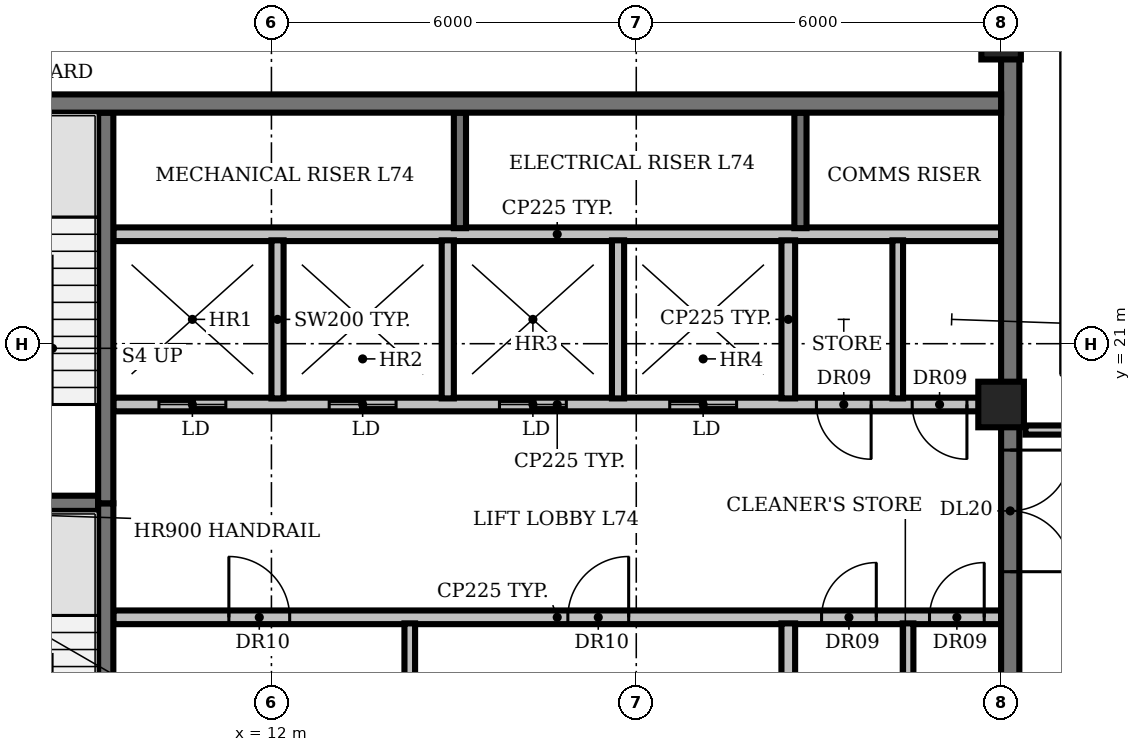
"""IFC4 building model, lengths in metres.
Left out: names, types, materials, properties, quantities, classifications, styles, units other than length and angle.
Written with IfcOpenShell. Run it as: python <this file> out.ifc"""

import sys

from ifc_helpers import new_model, si_unit, direction, frame, frame_2d, origin, origin_2d, place, context, subcontext, project, spatial, rectangle, circle, extrude, element, fill, save


model = new_model("IFC4")
c1 = context("Model", 3, precision=1e-05, world=origin(), true_north=direction((0.0, 1.0)))
c2 = subcontext(c1, "Body", "Model", "MODEL_VIEW")
j1 = project(units=[si_unit("LENGTHUNIT", "METRE"), si_unit("PLANEANGLEUNIT", "RADIAN")], contexts=[c1])
p1 = place(None, origin())
s1 = spatial("IfcSite", under=j1, at=p1, CompositionType="ELEMENT")
p2 = place(p1, origin())
s2 = spatial("IfcBuilding", under=s1, at=p2, CompositionType="ELEMENT")
p3 = place(p2, frame((0.0, 0.0, 331.4)))
s3 = spatial("IfcBuildingStorey", under=s2, at=p3, CompositionType="ELEMENT", Elevation=331.4)
p4 = place(p3, frame((24.0, 20.0, 0.0), z_axis=(0.0, 0.0, 1.0), x_axis=(1.0, 0.0, 0.0)))
e1 = element("IfcColumn", 1, at=p4, inside=s3, PredefinedType="COLUMN", context=c2, shape_type="SweptSolid", body=[
    extrude(circle(Radius=0.375, at=origin_2d()), origin(), (0.0, 0.0, 1.0), 3.9),
])
p5 = place(p3, frame((24.0, 26.0, 0.0), z_axis=(0.0, 0.0, 1.0), x_axis=(1.0, 0.0, 0.0)))
e2 = element("IfcColumn", 2, at=p5, inside=s3, PredefinedType="COLUMN", context=c2, shape_type="SweptSolid", body=[
    extrude(rectangle(XDim=0.65, YDim=0.65, at=origin_2d()), origin(), (0.0, 0.0, 1.0), 3.9),
])
p6 = place(p3, frame((9.4, 16.5, 0.0), z_axis=(0.0, 0.0, 1.0), x_axis=(1.0, 0.0, 0.0)))
e3 = element("IfcWall", 3, at=p6, inside=s3, PredefinedType="PARTITIONING", context=c2, shape_type="SweptSolid", body=[
    extrude(rectangle(XDim=14.6, YDim=0.225, at=frame_2d((7.3, 0.0))), origin(), (0.0, 0.0, 1.0), 3.9),
])
p7 = place(p6, frame((1.9, 0.0, 0.0)))
e4 = element("IfcOpeningElement", 4, at=p7, cuts=e3, PredefinedType="OPENING", context=c2, shape_type="SweptSolid", body=[
    extrude(rectangle(XDim=1.0, YDim=2.1, at=frame_2d((0.5, 1.05))), frame((0.0, 0.123, 0.0), z_axis=(0.0, -1.0, 0.0), x_axis=(1.0, 0.0, 0.0)), (0.0, 0.0, 1.0), 0.245),
])
p8 = place(p6, frame((7.475, 0.0, 0.0)))
e5 = element("IfcOpeningElement", 5, at=p8, cuts=e3, PredefinedType="OPENING", context=c2, shape_type="SweptSolid", body=[
    extrude(rectangle(XDim=1.0, YDim=2.1, at=frame_2d((0.5, 1.05))), frame((0.0, 0.123, 0.0), z_axis=(0.0, -1.0, 0.0), x_axis=(1.0, 0.0, 0.0)), (0.0, 0.0, 1.0), 0.245),
])
p9 = place(p6, frame((11.647, 0.0, 0.0)))
e6 = element("IfcOpeningElement", 6, at=p9, cuts=e3, PredefinedType="OPENING", context=c2, shape_type="SweptSolid", body=[
    extrude(rectangle(XDim=0.9, YDim=2.1, at=frame_2d((0.45, 1.05))), frame((0.0, 0.123, 0.0), z_axis=(0.0, -1.0, 0.0), x_axis=(1.0, 0.0, 0.0)), (0.0, 0.0, 1.0), 0.245),
])
p10 = place(p6, frame((13.423, 0.0, 0.0)))
e7 = element("IfcOpeningElement", 7, at=p10, cuts=e3, PredefinedType="OPENING", context=c2, shape_type="SweptSolid", body=[
    extrude(rectangle(XDim=0.9, YDim=2.1, at=frame_2d((0.45, 1.05))), frame((0.0, 0.123, 0.0), z_axis=(0.0, -1.0, 0.0), x_axis=(1.0, 0.0, 0.0)), (0.0, 0.0, 1.0), 0.245),
])
p11 = place(p3, frame((6.0, 18.375, 0.0), z_axis=(0.0, 0.0, 1.0), x_axis=(1.0, 0.0, 0.0)))
e8 = element("IfcWall", 8, at=p11, inside=s3, PredefinedType="SHEAR", context=c2, shape_type="SweptSolid", body=[
    extrude(rectangle(XDim=3.15, YDim=0.25, at=frame_2d((1.575, 0.0))), origin(), (0.0, 0.0, 1.0), 3.9),
])
p12 = place(p3, frame((24.0, 20.0, 0.0), z_axis=(0.0, 0.0, 1.0), x_axis=(-1.0, 0.0, 0.0)))
e9 = element("IfcWall", 9, at=p12, inside=s3, PredefinedType="PARTITIONING", context=c2, shape_type="SweptSolid", body=[
    extrude(rectangle(XDim=14.6, YDim=0.225, at=frame_2d((7.3, 0.0))), origin(), (0.0, 0.0, 1.0), 3.9),
])
p13 = place(p12, frame((12.75, 0.0, 0.0)))
e10 = element("IfcOpeningElement", 10, at=p13, cuts=e9, PredefinedType="OPENING", context=c2, shape_type="SweptSolid", body=[
    extrude(rectangle(XDim=1.1, YDim=2.1, at=frame_2d((0.55, 1.05))), frame((0.0, 0.123, 0.0), z_axis=(0.0, -1.0, 0.0), x_axis=(1.0, 0.0, 0.0)), (0.0, 0.0, 1.0), 0.245),
])
p14 = place(p12, frame((9.95, 0.0, 0.0)))
e11 = element("IfcOpeningElement", 11, at=p14, cuts=e9, PredefinedType="OPENING", context=c2, shape_type="SweptSolid", body=[
    extrude(rectangle(XDim=1.1, YDim=2.1, at=frame_2d((0.55, 1.05))), frame((0.0, 0.123, 0.0), z_axis=(0.0, -1.0, 0.0), x_axis=(1.0, 0.0, 0.0)), (0.0, 0.0, 1.0), 0.245),
])
p15 = place(p12, frame((7.15, 0.0, 0.0)))
e12 = element("IfcOpeningElement", 12, at=p15, cuts=e9, PredefinedType="OPENING", context=c2, shape_type="SweptSolid", body=[
    extrude(rectangle(XDim=1.1, YDim=2.1, at=frame_2d((0.55, 1.05))), frame((0.0, 0.123, 0.0), z_axis=(0.0, -1.0, 0.0), x_axis=(1.0, 0.0, 0.0)), (0.0, 0.0, 1.0), 0.245),
])
p16 = place(p12, frame((4.35, 0.0, 0.0)))
e13 = element("IfcOpeningElement", 13, at=p16, cuts=e9, PredefinedType="OPENING", context=c2, shape_type="SweptSolid", body=[
    extrude(rectangle(XDim=1.1, YDim=2.1, at=frame_2d((0.55, 1.05))), frame((0.0, 0.123, 0.0), z_axis=(0.0, -1.0, 0.0), x_axis=(1.0, 0.0, 0.0)), (0.0, 0.0, 1.0), 0.245),
])
p17 = place(p12, frame((2.137, 0.0, 0.0)))
e14 = element("IfcOpeningElement", 14, at=p17, cuts=e9, PredefinedType="OPENING", context=c2, shape_type="SweptSolid", body=[
    extrude(rectangle(XDim=0.9, YDim=2.1, at=frame_2d((0.45, 1.05))), frame((0.0, 0.123, 0.0), z_axis=(0.0, -1.0, 0.0), x_axis=(1.0, 0.0, 0.0)), (0.0, 0.0, 1.0), 0.245),
])
p18 = place(p12, frame((0.562, 0.0, 0.0)))
e15 = element("IfcOpeningElement", 15, at=p18, cuts=e9, PredefinedType="OPENING", context=c2, shape_type="SweptSolid", body=[
    extrude(rectangle(XDim=0.9, YDim=2.1, at=frame_2d((0.45, 1.05))), frame((0.0, 0.123, 0.0), z_axis=(0.0, -1.0, 0.0), x_axis=(1.0, 0.0, 0.0)), (0.0, 0.0, 1.0), 0.245),
])
p19 = place(p3, frame((9.4, 22.8, 0.0), z_axis=(0.0, 0.0, 1.0), x_axis=(1.0, 0.0, 0.0)))
e16 = element("IfcWall", 16, at=p19, inside=s3, PredefinedType="PARTITIONING", context=c2, shape_type="SweptSolid", body=[
    extrude(rectangle(XDim=14.6, YDim=0.225, at=frame_2d((7.3, 0.0))), origin(), (0.0, 0.0, 1.0), 3.9),
])
p20 = place(p3, frame((9.275, 18.375, 0.0), z_axis=(0.0, 0.0, 1.0), x_axis=(0.0, -1.0, 0.0)))
e17 = element("IfcWall", 17, at=p20, inside=s3, PredefinedType="SHEAR", context=c2, shape_type="SweptSolid", body=[
    extrude(rectangle(XDim=6.55, YDim=0.25, at=frame_2d((3.275, 0.0))), origin(), (0.0, 0.0, 1.0), 3.9),
])
p21 = place(p20, frame((5.075, 0.0, 0.0)))
e18 = element("IfcOpeningElement", 18, at=p21, cuts=e17, PredefinedType="OPENING", context=c2, shape_type="SweptSolid", body=[
    extrude(rectangle(XDim=1.0, YDim=2.1, at=frame_2d((0.5, 1.05))), frame((0.0, 0.135, 0.0), z_axis=(0.0, -1.0, 0.0), x_axis=(1.0, 0.0, 0.0)), (0.0, 0.0, 1.0), 0.27),
])
p22 = place(p3, frame((9.275, 18.375, 0.0), z_axis=(0.0, 0.0, 1.0), x_axis=(0.0, 1.0, 0.0)))
e19 = element("IfcWall", 19, at=p22, inside=s3, PredefinedType="SHEAR", context=c2, shape_type="SweptSolid", body=[
    extrude(rectangle(XDim=6.425, YDim=0.25, at=frame_2d((3.212, 0.0))), origin(), (0.0, 0.0, 1.0), 3.9),
])
p23 = place(p3, frame((12.1, 20.1, 0.0), z_axis=(0.0, 0.0, 1.0), x_axis=(0.0, 1.0, 0.0)))
e20 = element("IfcWall", 20, at=p23, inside=s3, PredefinedType="SOLIDWALL", context=c2, shape_type="SweptSolid", body=[
    extrude(rectangle(XDim=2.6, YDim=0.2, at=frame_2d((1.3, 0.0))), origin(), (0.0, 0.0, 1.0), 3.9),
])
p24 = place(p3, frame((14.275, 13.8, 0.0), z_axis=(0.0, 0.0, 1.0), x_axis=(0.0, 1.0, 0.0)))
e21 = element("IfcWall", 21, at=p24, inside=s3, PredefinedType="PARTITIONING", context=c2, shape_type="SweptSolid", body=[
    extrude(rectangle(XDim=2.6, YDim=0.175, at=frame_2d((1.3, 0.0))), origin(), (0.0, 0.0, 1.0), 3.9),
])
p25 = place(p3, frame((14.9, 20.1, 0.0), z_axis=(0.0, 0.0, 1.0), x_axis=(0.0, 1.0, 0.0)))
e22 = element("IfcWall", 22, at=p25, inside=s3, PredefinedType="SOLIDWALL", context=c2, shape_type="SweptSolid", body=[
    extrude(rectangle(XDim=2.6, YDim=0.2, at=frame_2d((1.3, 0.0))), origin(), (0.0, 0.0, 1.0), 3.9),
])
p26 = place(p3, frame((15.1, 22.9, 0.0), z_axis=(0.0, 0.0, 1.0), x_axis=(0.0, 1.0, 0.0)))
e23 = element("IfcWall", 23, at=p26, inside=s3, PredefinedType="SHEAR", context=c2, shape_type="SweptSolid", body=[
    extrude(rectangle(XDim=1.9, YDim=0.2, at=frame_2d((0.95, 0.0))), origin(), (0.0, 0.0, 1.0), 3.9),
])
p27 = place(p3, frame((17.7, 20.1, 0.0), z_axis=(0.0, 0.0, 1.0), x_axis=(0.0, 1.0, 0.0)))
e24 = element("IfcWall", 24, at=p27, inside=s3, PredefinedType="SOLIDWALL", context=c2, shape_type="SweptSolid", body=[
    extrude(rectangle(XDim=2.6, YDim=0.2, at=frame_2d((1.3, 0.0))), origin(), (0.0, 0.0, 1.0), 3.9),
])
for number, where, z_axis, x_axis in (
    (25, (20.5, 13.8, 0.0), (0.0, 0.0, 1.0), (0.0, 1.0, 0.0)),
    (26, (20.5, 20.1, 0.0), (0.0, 0.0, 1.0), (0.0, 1.0, 0.0)),
):
    element("IfcWall", number, at=place(p3, frame(where, z_axis=z_axis, x_axis=x_axis)), inside=s3, PredefinedType="PARTITIONING", context=c2, shape_type="SweptSolid", body=[
        extrude(rectangle(XDim=2.6, YDim=0.225, at=frame_2d((1.3, 0.0))), origin(), (0.0, 0.0, 1.0), 3.9),
    ])
p28 = place(p3, frame((20.7, 22.9, 0.0), z_axis=(0.0, 0.0, 1.0), x_axis=(0.0, 1.0, 0.0)))
e27 = element("IfcWall", 27, at=p28, inside=s3, PredefinedType="SHEAR", context=c2, shape_type="SweptSolid", body=[
    extrude(rectangle(XDim=1.9, YDim=0.2, at=frame_2d((0.95, 0.0))), origin(), (0.0, 0.0, 1.0), 3.9),
])
for number, where, z_axis, x_axis in (
    (28, (22.3, 20.1, 0.0), (0.0, 0.0, 1.0), (0.0, 1.0, 0.0)),
    (29, (22.47, 13.8, 0.0), (0.0, 0.0, 1.0), (0.0, 1.0, 0.0)),
):
    element("IfcWall", number, at=place(p3, frame(where, z_axis=z_axis, x_axis=x_axis)), inside=s3, PredefinedType="PARTITIONING", context=c2, shape_type="SweptSolid", body=[
        extrude(rectangle(XDim=2.6, YDim=0.175, at=frame_2d((1.3, 0.0))), origin(), (0.0, 0.0, 1.0), 3.9),
    ])
p29 = place(p3, frame((24.15, 25.705, 0.0), z_axis=(0.0, 0.0, 1.0), x_axis=(0.0, -1.0, 0.0)))
e30 = element("IfcWall", 30, at=p29, inside=s3, PredefinedType="SHEAR", context=c2, shape_type="SweptSolid", body=[
    extrude(rectangle(XDim=20.605, YDim=0.3, at=frame_2d((10.302, 0.0))), origin(), (0.0, 0.0, 1.0), 3.9),
])
p30 = place(p29, frame((18.555, 0.0, 0.0)))
e31 = element("IfcOpeningElement", 31, at=p30, cuts=e30, PredefinedType="OPENING", context=c2, shape_type="SweptSolid", body=[
    extrude(rectangle(XDim=1.5, YDim=2.1, at=frame_2d((0.75, 1.05))), frame((0.0, 0.16, 0.0), z_axis=(0.0, -1.0, 0.0), x_axis=(1.0, 0.0, 0.0)), (0.0, 0.0, 1.0), 0.32),
])
p31 = place(p29, frame((12.455, 0.0, 0.0)))
e32 = element("IfcOpeningElement", 32, at=p31, cuts=e30, PredefinedType="OPENING", context=c2, shape_type="SweptSolid", body=[
    extrude(rectangle(XDim=0.9, YDim=2.1, at=frame_2d((0.45, 1.05))), frame((0.0, 0.16, 0.0), z_axis=(0.0, -1.0, 0.0), x_axis=(1.0, 0.0, 0.0)), (0.0, 0.0, 1.0), 0.32),
])
p32 = place(p29, frame((6.455, 0.0, 0.0)))
e33 = element("IfcOpeningElement", 33, at=p32, cuts=e30, PredefinedType="OPENING", context=c2, shape_type="SweptSolid", body=[
    extrude(rectangle(XDim=2.0, YDim=2.1, at=frame_2d((1.0, 1.05))), frame((0.0, 0.16, 0.0), z_axis=(0.0, -1.0, 0.0), x_axis=(1.0, 0.0, 0.0)), (0.0, 0.0, 1.0), 0.32),
])
p33 = place(p3, frame((6.0, 24.95, 0.0), z_axis=(0.0, 0.0, 1.0), x_axis=(1.0, 0.0, 0.0)))
e34 = element("IfcWall", 34, at=p33, inside=s3, PredefinedType="SHEAR", context=c2, shape_type="SweptSolid", body=[
    extrude(rectangle(XDim=18.0, YDim=0.3, at=frame_2d((9.0, 0.0))), origin(), (0.0, 0.0, 1.0), 3.9),
])
p34 = place(p3, frame((24.4, 19.58, 0.0), z_axis=(0.0, 0.0, 1.0), x_axis=(1.0, 0.0, 0.0)))
e35 = element("IfcWall", 35, at=p34, inside=s3, PredefinedType="PARTITIONING", context=c2, shape_type="SweptSolid", body=[
    extrude(rectangle(XDim=1.497, YDim=0.15, at=frame_2d((0.748, 0.0))), origin(), (0.0, 0.0, 1.0), 2.48),
])
p35 = place(p7, origin())
e36 = element("IfcDoor", 36, at=p35, inside=s3, OperationType="SINGLE_SWING_LEFT", PredefinedType="DOOR", context=c2, shape_type="SweptSolid", body=[
    extrude(rectangle(XDim=1.0, YDim=2.1, at=frame_2d((0.5, 1.05))), frame((0.0, 0.025, 0.0), z_axis=(0.0, -1.0, 0.0), x_axis=(1.0, 0.0, 0.0)), (0.0, 0.0, 1.0), 0.05),
])
fill(e4, e36)
p36 = place(p8, origin())
e37 = element("IfcDoor", 37, at=p36, inside=s3, OperationType="SINGLE_SWING_RIGHT", PredefinedType="DOOR", context=c2, shape_type="SweptSolid", body=[
    extrude(rectangle(XDim=1.0, YDim=2.1, at=frame_2d((0.5, 1.05))), frame((0.0, 0.025, 0.0), z_axis=(0.0, -1.0, 0.0), x_axis=(1.0, 0.0, 0.0)), (0.0, 0.0, 1.0), 0.05),
])
fill(e5, e37)
p37 = place(p9, origin())
e38 = element("IfcDoor", 38, at=p37, inside=s3, OperationType="SINGLE_SWING_RIGHT", PredefinedType="DOOR", context=c2, shape_type="SweptSolid", body=[
    extrude(rectangle(XDim=0.9, YDim=2.1, at=frame_2d((0.45, 1.05))), frame((0.0, 0.025, 0.0), z_axis=(0.0, -1.0, 0.0), x_axis=(1.0, 0.0, 0.0)), (0.0, 0.0, 1.0), 0.05),
])
fill(e6, e38)
p38 = place(p10, origin())
e39 = element("IfcDoor", 39, at=p38, inside=s3, OperationType="SINGLE_SWING_RIGHT", PredefinedType="DOOR", context=c2, shape_type="SweptSolid", body=[
    extrude(rectangle(XDim=0.9, YDim=2.1, at=frame_2d((0.45, 1.05))), frame((0.0, 0.025, 0.0), z_axis=(0.0, -1.0, 0.0), x_axis=(1.0, 0.0, 0.0)), (0.0, 0.0, 1.0), 0.05),
])
fill(e7, e39)
p39 = place(p13, origin())
e40 = element("IfcDoor", 40, at=p39, inside=s3, OperationType="DOUBLE_DOOR_SLIDING", PredefinedType="DOOR", context=c2, shape_type="SweptSolid", body=[
    extrude(rectangle(XDim=1.1, YDim=2.1, at=frame_2d((0.55, 1.05))), frame((0.0, 0.025, 0.0), z_axis=(0.0, -1.0, 0.0), x_axis=(1.0, 0.0, 0.0)), (0.0, 0.0, 1.0), 0.05),
])
fill(e10, e40)
p40 = place(p14, origin())
e41 = element("IfcDoor", 41, at=p40, inside=s3, OperationType="DOUBLE_DOOR_SLIDING", PredefinedType="DOOR", context=c2, shape_type="SweptSolid", body=[
    extrude(rectangle(XDim=1.1, YDim=2.1, at=frame_2d((0.55, 1.05))), frame((0.0, 0.025, 0.0), z_axis=(0.0, -1.0, 0.0), x_axis=(1.0, 0.0, 0.0)), (0.0, 0.0, 1.0), 0.05),
])
fill(e11, e41)
p41 = place(p15, origin())
e42 = element("IfcDoor", 42, at=p41, inside=s3, OperationType="DOUBLE_DOOR_SLIDING", PredefinedType="DOOR", context=c2, shape_type="SweptSolid", body=[
    extrude(rectangle(XDim=1.1, YDim=2.1, at=frame_2d((0.55, 1.05))), frame((0.0, 0.025, 0.0), z_axis=(0.0, -1.0, 0.0), x_axis=(1.0, 0.0, 0.0)), (0.0, 0.0, 1.0), 0.05),
])
fill(e12, e42)
p42 = place(p16, origin())
e43 = element("IfcDoor", 43, at=p42, inside=s3, OperationType="DOUBLE_DOOR_SLIDING", PredefinedType="DOOR", context=c2, shape_type="SweptSolid", body=[
    extrude(rectangle(XDim=1.1, YDim=2.1, at=frame_2d((0.55, 1.05))), frame((0.0, 0.025, 0.0), z_axis=(0.0, -1.0, 0.0), x_axis=(1.0, 0.0, 0.0)), (0.0, 0.0, 1.0), 0.05),
])
fill(e13, e43)
p43 = place(p17, origin())
e44 = element("IfcDoor", 44, at=p43, inside=s3, OperationType="SINGLE_SWING_LEFT", PredefinedType="DOOR", context=c2, shape_type="SweptSolid", body=[
    extrude(rectangle(XDim=0.9, YDim=2.1, at=frame_2d((0.45, 1.05))), frame((0.0, 0.025, 0.0), z_axis=(0.0, -1.0, 0.0), x_axis=(1.0, 0.0, 0.0)), (0.0, 0.0, 1.0), 0.05),
])
fill(e14, e44)
p44 = place(p18, origin())
e45 = element("IfcDoor", 45, at=p44, inside=s3, OperationType="SINGLE_SWING_LEFT", PredefinedType="DOOR", context=c2, shape_type="SweptSolid", body=[
    extrude(rectangle(XDim=0.9, YDim=2.1, at=frame_2d((0.45, 1.05))), frame((0.0, 0.025, 0.0), z_axis=(0.0, -1.0, 0.0), x_axis=(1.0, 0.0, 0.0)), (0.0, 0.0, 1.0), 0.05),
])
fill(e15, e45)
p45 = place(p32, origin())
e46 = element("IfcDoor", 46, at=p45, inside=s3, OperationType="DOUBLE_DOOR_SINGLE_SWING", PredefinedType="DOOR", context=c2, shape_type="SweptSolid", body=[
    extrude(rectangle(XDim=2.0, YDim=2.1, at=frame_2d((1.0, 1.05))), frame((0.0, 0.025, 0.0), z_axis=(0.0, -1.0, 0.0), x_axis=(1.0, 0.0, 0.0)), (0.0, 0.0, 1.0), 0.05),
])
fill(e33, e46)
save(model, sys.argv[1])
